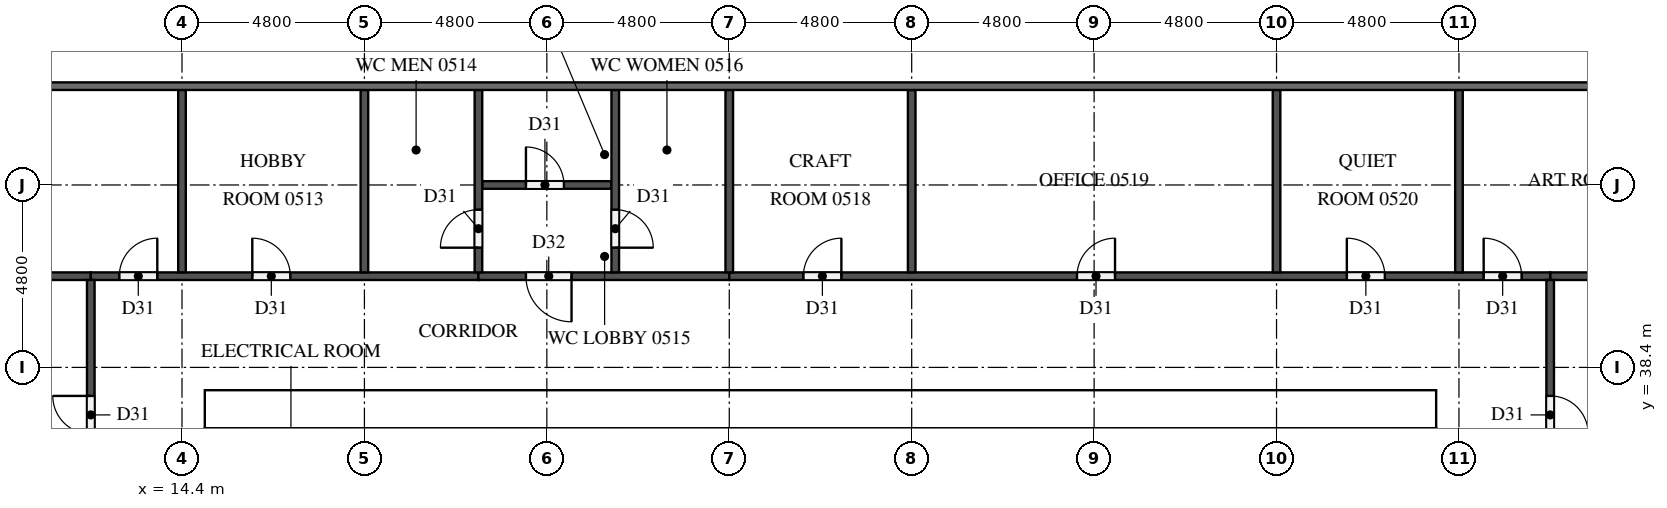
"""IFC4 building model, lengths in metres.
Left out: names, types, materials, properties, quantities, classifications, styles, units other than length and angle.
Written with IfcOpenShell. Run it as: python <this file> out.ifc"""

import sys

from ifc_helpers import new_model, si_unit, direction, frame, frame_2d, origin, place, context, subcontext, project, spatial, rectangle, extrude, element, fill, save


model = new_model("IFC4")
c1 = context("Model", 3, precision=1e-05, world=origin(), true_north=direction((0.0, 1.0)))
c2 = subcontext(c1, "Body", "Model", "MODEL_VIEW")
j1 = project(units=[si_unit("LENGTHUNIT", "METRE"), si_unit("PLANEANGLEUNIT", "RADIAN")], contexts=[c1])
p1 = place(None, origin())
s1 = spatial("IfcSite", under=j1, at=p1, CompositionType="ELEMENT")
p2 = place(p1, origin())
s2 = spatial("IfcBuilding", under=s1, at=p2, CompositionType="ELEMENT")
p3 = place(p2, frame((0.0, 0.0, 24.0)))
s3 = spatial("IfcBuildingStorey", under=s2, at=p3, CompositionType="ELEMENT", Elevation=24.0)
p4 = place(p3, frame((15.0, 37.3, 0.0), z_axis=(0.0, 0.0, 1.0), x_axis=(1.0, 0.0, 0.0)))
e1 = element("IfcWall", 1, at=p4, inside=s3, PredefinedType="SHEAR", context=c2, shape_type="SweptSolid", body=[
    extrude(rectangle(XDim=32.4, YDim=1.0, at=frame_2d((16.2, 0.0))), origin(), (0.0, 0.0, 1.0), 5.1),
])
p5 = place(p4, frame((15.3, 0.0, 0.0)))
e2 = element("IfcOpeningElement", 2, at=p5, cuts=e1, PredefinedType="OPENING", context=c2, shape_type="SweptSolid", body=[
    extrude(rectangle(XDim=1.8, YDim=2.1, at=frame_2d((0.9, 1.05))), frame((0.0, 0.51, 0.0), z_axis=(0.0, -1.0, 0.0), x_axis=(1.0, 0.0, 0.0)), (0.0, 0.0, 1.0), 1.02),
])
p6 = place(p4, frame((1.766, 0.0, 0.0)))
e3 = element("IfcOpeningElement", 3, at=p6, cuts=e1, PredefinedType="OPENING", context=c2, shape_type="SweptSolid", body=[
    extrude(rectangle(XDim=1.0, YDim=2.1, at=frame_2d((0.5, 1.05))), frame((0.0, 0.51, 0.0), z_axis=(0.0, -1.0, 0.0), x_axis=(1.0, 0.0, 0.0)), (0.0, 0.0, 1.0), 1.02),
])
p7 = place(p4, frame((5.241, 0.0, 0.0)))
e4 = element("IfcOpeningElement", 4, at=p7, cuts=e1, PredefinedType="OPENING", context=c2, shape_type="SweptSolid", body=[
    extrude(rectangle(XDim=1.0, YDim=2.1, at=frame_2d((0.5, 1.05))), frame((0.0, 0.51, 0.0), z_axis=(0.0, -1.0, 0.0), x_axis=(1.0, 0.0, 0.0)), (0.0, 0.0, 1.0), 1.02),
])
for number, where, z_axis, x_axis in (
    (5, (28.7, 33.9, 0.0), (0.0, 0.0, 1.0), (0.0, 1.0, 0.0)),
    (6, (33.7, 33.9, 0.0), (0.0, 0.0, 1.0), (0.0, 1.0, 0.0)),
):
    element("IfcWall", number, at=place(p3, frame(where, z_axis=z_axis, x_axis=x_axis)), inside=s3, PredefinedType="SHEAR", context=c2, shape_type="SweptSolid", body=[
        extrude(rectangle(XDim=2.9, YDim=0.7, at=frame_2d((1.45, 0.0))), origin(), (0.0, 0.0, 1.0), 5.1),
    ])
for number, where, z_axis, x_axis in (
    (7, (25.9, 33.9, 0.0), (0.0, 0.0, 1.0), (0.0, 1.0, 0.0)),
    (8, (36.5, 33.9, 0.0), (0.0, 0.0, 1.0), (0.0, 1.0, 0.0)),
):
    element("IfcWall", number, at=place(p3, frame(where, z_axis=z_axis, x_axis=x_axis)), inside=s3, PredefinedType="SOLIDWALL", context=c2, shape_type="SweptSolid", body=[
        extrude(rectangle(XDim=2.9, YDim=0.2, at=frame_2d((1.45, 0.0))), origin(), (0.0, 0.0, 1.0), 5.1),
    ])
p8 = place(p3, frame((18.633, 31.6, 0.0), z_axis=(0.0, 0.0, 1.0), x_axis=(0.0, 1.0, 0.0)))
e9 = element("IfcWall", 9, at=p8, inside=s3, PredefinedType="PARTITIONING", context=c2, shape_type="SweptSolid", body=[
    extrude(rectangle(XDim=5.2, YDim=0.2, at=frame_2d((2.6, 0.0))), origin(), (0.0, 0.0, 1.0), 5.1),
])
p9 = place(p3, frame((2.3, 40.8, 0.0), z_axis=(0.0, 0.0, 1.0), x_axis=(1.0, 0.0, 0.0)))
e10 = element("IfcWall", 10, at=p9, inside=s3, PredefinedType="PARTITIONING", context=c2, shape_type="SweptSolid", body=[
    extrude(rectangle(XDim=9.7, YDim=0.2, at=frame_2d((4.85, 0.0))), origin(), (0.0, 0.0, 1.0), 5.1),
])
p10 = place(p3, frame((50.4, 40.8, 0.0), z_axis=(0.0, 0.0, 1.0), x_axis=(1.0, 0.0, 0.0)))
e11 = element("IfcWall", 11, at=p10, inside=s3, PredefinedType="PARTITIONING", context=c2, shape_type="SweptSolid", body=[
    extrude(rectangle(XDim=4.9, YDim=0.2, at=frame_2d((2.45, 0.0))), origin(), (0.0, 0.0, 1.0), 5.1),
])
p11 = place(p3, frame((12.0, 40.8, 0.0), z_axis=(0.0, 0.0, 1.0), x_axis=(1.0, 0.0, 0.0)))
e12 = element("IfcWall", 12, at=p11, inside=s3, PredefinedType="PARTITIONING", context=c2, shape_type="SweptSolid", body=[
    extrude(rectangle(XDim=10.2, YDim=0.2, at=frame_2d((5.1, 0.0))), origin(), (0.0, 0.0, 1.0), 5.1),
])
p12 = place(p11, frame((0.75, 0.0, 0.0)))
e13 = element("IfcOpeningElement", 13, at=p12, cuts=e12, PredefinedType="OPENING", context=c2, shape_type="SweptSolid", body=[
    extrude(rectangle(XDim=1.0, YDim=2.1, at=frame_2d((0.5, 1.05))), frame((0.0, 0.11, 0.0), z_axis=(0.0, -1.0, 0.0), x_axis=(1.0, 0.0, 0.0)), (0.0, 0.0, 1.0), 0.22),
])
p13 = place(p11, frame((4.25, 0.0, 0.0)))
e14 = element("IfcOpeningElement", 14, at=p13, cuts=e12, PredefinedType="OPENING", context=c2, shape_type="SweptSolid", body=[
    extrude(rectangle(XDim=1.0, YDim=2.1, at=frame_2d((0.5, 1.05))), frame((0.0, 0.11, 0.0), z_axis=(0.0, -1.0, 0.0), x_axis=(1.0, 0.0, 0.0)), (0.0, 0.0, 1.0), 0.22),
])
p14 = place(p3, frame((28.8, 40.8, 0.0), z_axis=(0.0, 0.0, 1.0), x_axis=(-1.0, 0.0, 0.0)))
e15 = element("IfcWall", 15, at=p14, inside=s3, PredefinedType="PARTITIONING", context=c2, shape_type="SweptSolid", body=[
    extrude(rectangle(XDim=6.6, YDim=0.2, at=frame_2d((3.3, 0.0))), origin(), (0.0, 0.0, 1.0), 5.1),
])
p15 = place(p14, frame((4.15, 0.0, 0.0)))
e16 = element("IfcOpeningElement", 16, at=p15, cuts=e15, PredefinedType="OPENING", context=c2, shape_type="SweptSolid", body=[
    extrude(rectangle(XDim=1.2, YDim=2.1, at=frame_2d((0.6, 1.05))), frame((0.0, 0.11, 0.0), z_axis=(0.0, -1.0, 0.0), x_axis=(1.0, 0.0, 0.0)), (0.0, 0.0, 1.0), 0.22),
])
p16 = place(p3, frame((28.8, 40.8, 0.0), z_axis=(0.0, 0.0, 1.0), x_axis=(1.0, 0.0, 0.0)))
e17 = element("IfcWall", 17, at=p16, inside=s3, PredefinedType="PARTITIONING", context=c2, shape_type="SweptSolid", body=[
    extrude(rectangle(XDim=21.6, YDim=0.2, at=frame_2d((10.8, 0.0))), origin(), (0.0, 0.0, 1.0), 5.1),
])
p17 = place(p16, frame((1.95, 0.0, 0.0)))
e18 = element("IfcOpeningElement", 18, at=p17, cuts=e17, PredefinedType="OPENING", context=c2, shape_type="SweptSolid", body=[
    extrude(rectangle(XDim=1.0, YDim=2.1, at=frame_2d((0.5, 1.05))), frame((0.0, 0.11, 0.0), z_axis=(0.0, -1.0, 0.0), x_axis=(1.0, 0.0, 0.0)), (0.0, 0.0, 1.0), 0.22),
])
p18 = place(p16, frame((9.15, 0.0, 0.0)))
e19 = element("IfcOpeningElement", 19, at=p18, cuts=e17, PredefinedType="OPENING", context=c2, shape_type="SweptSolid", body=[
    extrude(rectangle(XDim=1.0, YDim=2.1, at=frame_2d((0.5, 1.05))), frame((0.0, 0.11, 0.0), z_axis=(0.0, -1.0, 0.0), x_axis=(1.0, 0.0, 0.0)), (0.0, 0.0, 1.0), 0.22),
])
p19 = place(p16, frame((16.25, 0.0, 0.0)))
e20 = element("IfcOpeningElement", 20, at=p19, cuts=e17, PredefinedType="OPENING", context=c2, shape_type="SweptSolid", body=[
    extrude(rectangle(XDim=1.0, YDim=2.1, at=frame_2d((0.5, 1.05))), frame((0.0, 0.11, 0.0), z_axis=(0.0, -1.0, 0.0), x_axis=(1.0, 0.0, 0.0)), (0.0, 0.0, 1.0), 0.22),
])
p20 = place(p16, frame((19.85, 0.0, 0.0)))
e21 = element("IfcOpeningElement", 21, at=p20, cuts=e17, PredefinedType="OPENING", context=c2, shape_type="SweptSolid", body=[
    extrude(rectangle(XDim=1.0, YDim=2.1, at=frame_2d((0.5, 1.05))), frame((0.0, 0.11, 0.0), z_axis=(0.0, -1.0, 0.0), x_axis=(1.0, 0.0, 0.0)), (0.0, 0.0, 1.0), 0.22),
])
p21 = place(p3, frame((22.3, 43.2, 0.0), z_axis=(0.0, 0.0, 1.0), x_axis=(1.0, 0.0, 0.0)))
e22 = element("IfcWall", 22, at=p21, inside=s3, PredefinedType="PARTITIONING", context=c2, shape_type="SweptSolid", body=[
    extrude(rectangle(XDim=3.4, YDim=0.2, at=frame_2d((1.7, 0.0))), origin(), (0.0, 0.0, 1.0), 5.1),
])
p22 = place(p21, frame((1.15, 0.0, 0.0)))
e23 = element("IfcOpeningElement", 23, at=p22, cuts=e22, PredefinedType="OPENING", context=c2, shape_type="SweptSolid", body=[
    extrude(rectangle(XDim=1.0, YDim=2.1, at=frame_2d((0.5, 1.05))), frame((0.0, 0.11, 0.0), z_axis=(0.0, -1.0, 0.0), x_axis=(1.0, 0.0, 0.0)), (0.0, 0.0, 1.0), 0.22),
])
p23 = place(p3, frame((12.0, 12.1, 0.0), z_axis=(0.0, 0.0, 1.0), x_axis=(0.0, 1.0, 0.0)))
e24 = element("IfcWall", 24, at=p23, inside=s3, PredefinedType="PARTITIONING", context=c2, shape_type="SweptSolid", body=[
    extrude(rectangle(XDim=28.6, YDim=0.2, at=frame_2d((14.3, 0.0))), origin(), (0.0, 0.0, 1.0), 5.1),
])
p24 = place(p23, frame((3.05, 0.0, 0.0)))
e25 = element("IfcOpeningElement", 25, at=p24, cuts=e24, PredefinedType="OPENING", context=c2, shape_type="SweptSolid", body=[
    extrude(rectangle(XDim=1.0, YDim=2.1, at=frame_2d((0.5, 1.05))), frame((0.0, 0.11, 0.0), z_axis=(0.0, -1.0, 0.0), x_axis=(1.0, 0.0, 0.0)), (0.0, 0.0, 1.0), 0.22),
])
p25 = place(p23, frame((9.05, 0.0, 0.0)))
e26 = element("IfcOpeningElement", 26, at=p25, cuts=e24, PredefinedType="OPENING", context=c2, shape_type="SweptSolid", body=[
    extrude(rectangle(XDim=1.0, YDim=2.1, at=frame_2d((0.5, 1.05))), frame((0.0, 0.11, 0.0), z_axis=(0.0, -1.0, 0.0), x_axis=(1.0, 0.0, 0.0)), (0.0, 0.0, 1.0), 0.22),
])
p26 = place(p23, frame((13.85, 0.0, 0.0)))
e27 = element("IfcOpeningElement", 27, at=p26, cuts=e24, PredefinedType="OPENING", context=c2, shape_type="SweptSolid", body=[
    extrude(rectangle(XDim=1.0, YDim=2.1, at=frame_2d((0.5, 1.05))), frame((0.0, 0.11, 0.0), z_axis=(0.0, -1.0, 0.0), x_axis=(1.0, 0.0, 0.0)), (0.0, 0.0, 1.0), 0.22),
])
p27 = place(p23, frame((18.65, 0.0, 0.0)))
e28 = element("IfcOpeningElement", 28, at=p27, cuts=e24, PredefinedType="OPENING", context=c2, shape_type="SweptSolid", body=[
    extrude(rectangle(XDim=1.0, YDim=2.1, at=frame_2d((0.5, 1.05))), frame((0.0, 0.11, 0.0), z_axis=(0.0, -1.0, 0.0), x_axis=(1.0, 0.0, 0.0)), (0.0, 0.0, 1.0), 0.22),
])
p28 = place(p23, frame((24.55, 0.0, 0.0)))
e29 = element("IfcOpeningElement", 29, at=p28, cuts=e24, PredefinedType="OPENING", context=c2, shape_type="SweptSolid", body=[
    extrude(rectangle(XDim=1.0, YDim=2.1, at=frame_2d((0.5, 1.05))), frame((0.0, 0.11, 0.0), z_axis=(0.0, -1.0, 0.0), x_axis=(1.0, 0.0, 0.0)), (0.0, 0.0, 1.0), 0.22),
])
for number, where, z_axis, x_axis in (
    (30, (14.4, 40.9, 0.0), (0.0, 0.0, 1.0), (0.0, 1.0, 0.0)),
    (31, (19.2, 40.9, 0.0), (0.0, 0.0, 1.0), (0.0, 1.0, 0.0)),
):
    element("IfcWall", number, at=place(p3, frame(where, z_axis=z_axis, x_axis=x_axis)), inside=s3, PredefinedType="PARTITIONING", context=c2, shape_type="SweptSolid", body=[
        extrude(rectangle(XDim=4.8, YDim=0.2, at=frame_2d((2.4, 0.0))), origin(), (0.0, 0.0, 1.0), 5.1),
    ])
p29 = place(p3, frame((22.2, 40.9, 0.0), z_axis=(0.0, 0.0, 1.0), x_axis=(0.0, 1.0, 0.0)))
e32 = element("IfcWall", 32, at=p29, inside=s3, PredefinedType="PARTITIONING", context=c2, shape_type="SweptSolid", body=[
    extrude(rectangle(XDim=4.8, YDim=0.2, at=frame_2d((2.4, 0.0))), origin(), (0.0, 0.0, 1.0), 5.1),
])
p30 = place(p29, frame((0.65, 0.0, 0.0)))
e33 = element("IfcOpeningElement", 33, at=p30, cuts=e32, PredefinedType="OPENING", context=c2, shape_type="SweptSolid", body=[
    extrude(rectangle(XDim=1.0, YDim=2.1, at=frame_2d((0.5, 1.05))), frame((0.0, 0.11, 0.0), z_axis=(0.0, -1.0, 0.0), x_axis=(1.0, 0.0, 0.0)), (0.0, 0.0, 1.0), 0.22),
])
p31 = place(p3, frame((25.8, 45.7, 0.0), z_axis=(0.0, 0.0, 1.0), x_axis=(0.0, -1.0, 0.0)))
e34 = element("IfcWall", 34, at=p31, inside=s3, PredefinedType="PARTITIONING", context=c2, shape_type="SweptSolid", body=[
    extrude(rectangle(XDim=4.8, YDim=0.2, at=frame_2d((2.4, 0.0))), origin(), (0.0, 0.0, 1.0), 5.1),
])
p32 = place(p31, frame((3.15, 0.0, 0.0)))
e35 = element("IfcOpeningElement", 35, at=p32, cuts=e34, PredefinedType="OPENING", context=c2, shape_type="SweptSolid", body=[
    extrude(rectangle(XDim=1.0, YDim=2.1, at=frame_2d((0.5, 1.05))), frame((0.0, 0.11, 0.0), z_axis=(0.0, -1.0, 0.0), x_axis=(1.0, 0.0, 0.0)), (0.0, 0.0, 1.0), 0.22),
])
for number, where, z_axis, x_axis in (
    (36, (28.8, 40.9, 0.0), (0.0, 0.0, 1.0), (0.0, 1.0, 0.0)),
    (37, (33.6, 40.9, 0.0), (0.0, 0.0, 1.0), (0.0, 1.0, 0.0)),
    (38, (43.2, 40.9, 0.0), (0.0, 0.0, 1.0), (0.0, 1.0, 0.0)),
    (39, (48.0, 40.9, 0.0), (0.0, 0.0, 1.0), (0.0, 1.0, 0.0)),
):
    element("IfcWall", number, at=place(p3, frame(where, z_axis=z_axis, x_axis=x_axis)), inside=s3, PredefinedType="PARTITIONING", context=c2, shape_type="SweptSolid", body=[
        extrude(rectangle(XDim=4.8, YDim=0.2, at=frame_2d((2.4, 0.0))), origin(), (0.0, 0.0, 1.0), 5.1),
    ])
p33 = place(p3, frame((50.4, 40.7, 0.0), z_axis=(0.0, 0.0, 1.0), x_axis=(0.0, -1.0, 0.0)))
e40 = element("IfcWall", 40, at=p33, inside=s3, PredefinedType="PARTITIONING", context=c2, shape_type="SweptSolid", body=[
    extrude(rectangle(XDim=28.6, YDim=0.2, at=frame_2d((14.3, 0.0))), origin(), (0.0, 0.0, 1.0), 5.1),
])
p34 = place(p33, frame((24.55, 0.0, 0.0)))
e41 = element("IfcOpeningElement", 41, at=p34, cuts=e40, PredefinedType="OPENING", context=c2, shape_type="SweptSolid", body=[
    extrude(rectangle(XDim=1.0, YDim=2.1, at=frame_2d((0.5, 1.05))), frame((0.0, 0.11, 0.0), z_axis=(0.0, -1.0, 0.0), x_axis=(1.0, 0.0, 0.0)), (0.0, 0.0, 1.0), 0.22),
])
p35 = place(p33, frame((18.65, 0.0, 0.0)))
e42 = element("IfcOpeningElement", 42, at=p35, cuts=e40, PredefinedType="OPENING", context=c2, shape_type="SweptSolid", body=[
    extrude(rectangle(XDim=1.0, YDim=2.1, at=frame_2d((0.5, 1.05))), frame((0.0, 0.11, 0.0), z_axis=(0.0, -1.0, 0.0), x_axis=(1.0, 0.0, 0.0)), (0.0, 0.0, 1.0), 0.22),
])
p36 = place(p33, frame((13.85, 0.0, 0.0)))
e43 = element("IfcOpeningElement", 43, at=p36, cuts=e40, PredefinedType="OPENING", context=c2, shape_type="SweptSolid", body=[
    extrude(rectangle(XDim=1.0, YDim=2.1, at=frame_2d((0.5, 1.05))), frame((0.0, 0.11, 0.0), z_axis=(0.0, -1.0, 0.0), x_axis=(1.0, 0.0, 0.0)), (0.0, 0.0, 1.0), 0.22),
])
p37 = place(p33, frame((9.05, 0.0, 0.0)))
e44 = element("IfcOpeningElement", 44, at=p37, cuts=e40, PredefinedType="OPENING", context=c2, shape_type="SweptSolid", body=[
    extrude(rectangle(XDim=1.0, YDim=2.1, at=frame_2d((0.5, 1.05))), frame((0.0, 0.11, 0.0), z_axis=(0.0, -1.0, 0.0), x_axis=(1.0, 0.0, 0.0)), (0.0, 0.0, 1.0), 0.22),
])
p38 = place(p33, frame((3.05, 0.0, 0.0)))
e45 = element("IfcOpeningElement", 45, at=p38, cuts=e40, PredefinedType="OPENING", context=c2, shape_type="SweptSolid", body=[
    extrude(rectangle(XDim=1.0, YDim=2.1, at=frame_2d((0.5, 1.05))), frame((0.0, 0.11, 0.0), z_axis=(0.0, -1.0, 0.0), x_axis=(1.0, 0.0, 0.0)), (0.0, 0.0, 1.0), 0.22),
])
p39 = place(p5, origin())
e46 = element("IfcDoor", 46, at=p39, inside=s3, OperationType="DOUBLE_DOOR_SINGLE_SWING", PredefinedType="DOOR", context=c2, shape_type="SweptSolid", body=[
    extrude(rectangle(XDim=1.8, YDim=2.1, at=frame_2d((0.9, 1.05))), frame((0.0, 0.025, 0.0), z_axis=(0.0, -1.0, 0.0), x_axis=(1.0, 0.0, 0.0)), (0.0, 0.0, 1.0), 0.05),
])
fill(e2, e46)
p40 = place(p6, origin())
e47 = element("IfcDoor", 47, at=p40, inside=s3, OperationType="SINGLE_SWING_RIGHT", PredefinedType="DOOR", context=c2, shape_type="SweptSolid", body=[
    extrude(rectangle(XDim=1.0, YDim=2.1, at=frame_2d((0.5, 1.05))), frame((0.0, 0.025, 0.0), z_axis=(0.0, -1.0, 0.0), x_axis=(1.0, 0.0, 0.0)), (0.0, 0.0, 1.0), 0.05),
])
fill(e3, e47)
p41 = place(p7, origin())
e48 = element("IfcDoor", 48, at=p41, inside=s3, OperationType="SINGLE_SWING_LEFT", PredefinedType="DOOR", context=c2, shape_type="SweptSolid", body=[
    extrude(rectangle(XDim=1.0, YDim=2.1, at=frame_2d((0.5, 1.05))), frame((0.0, 0.025, 0.0), z_axis=(0.0, -1.0, 0.0), x_axis=(1.0, 0.0, 0.0)), (0.0, 0.0, 1.0), 0.05),
])
fill(e4, e48)
p42 = place(p28, origin())
e49 = element("IfcDoor", 49, at=p42, inside=s3, OperationType="SINGLE_SWING_RIGHT", PredefinedType="DOOR", context=c2, shape_type="SweptSolid", body=[
    extrude(rectangle(XDim=1.0, YDim=2.1, at=frame_2d((0.5, 1.05))), frame((0.0, 0.025, 0.0), z_axis=(0.0, -1.0, 0.0), x_axis=(1.0, 0.0, 0.0)), (0.0, 0.0, 1.0), 0.05),
])
fill(e29, e49)
p43 = place(p12, origin())
e50 = element("IfcDoor", 50, at=p43, inside=s3, OperationType="SINGLE_SWING_RIGHT", PredefinedType="DOOR", context=c2, shape_type="SweptSolid", body=[
    extrude(rectangle(XDim=1.0, YDim=2.1, at=frame_2d((0.5, 1.05))), frame((0.0, 0.025, 0.0), z_axis=(0.0, -1.0, 0.0), x_axis=(1.0, 0.0, 0.0)), (0.0, 0.0, 1.0), 0.05),
])
fill(e13, e50)
p44 = place(p13, origin())
e51 = element("IfcDoor", 51, at=p44, inside=s3, OperationType="SINGLE_SWING_LEFT", PredefinedType="DOOR", context=c2, shape_type="SweptSolid", body=[
    extrude(rectangle(XDim=1.0, YDim=2.1, at=frame_2d((0.5, 1.05))), frame((0.0, 0.025, 0.0), z_axis=(0.0, -1.0, 0.0), x_axis=(1.0, 0.0, 0.0)), (0.0, 0.0, 1.0), 0.05),
])
fill(e14, e51)
p45 = place(p15, origin())
e52 = element("IfcDoor", 52, at=p45, inside=s3, OperationType="SINGLE_SWING_LEFT", PredefinedType="DOOR", context=c2, shape_type="SweptSolid", body=[
    extrude(rectangle(XDim=1.2, YDim=2.1, at=frame_2d((0.6, 1.05))), frame((0.0, 0.025, 0.0), z_axis=(0.0, -1.0, 0.0), x_axis=(1.0, 0.0, 0.0)), (0.0, 0.0, 1.0), 0.05),
])
fill(e16, e52)
p46 = place(p30, origin())
e53 = element("IfcDoor", 53, at=p46, inside=s3, OperationType="SINGLE_SWING_LEFT", PredefinedType="DOOR", context=c2, shape_type="SweptSolid", body=[
    extrude(rectangle(XDim=1.0, YDim=2.1, at=frame_2d((0.5, 1.05))), frame((0.0, 0.025, 0.0), z_axis=(0.0, -1.0, 0.0), x_axis=(1.0, 0.0, 0.0)), (0.0, 0.0, 1.0), 0.05),
])
fill(e33, e53)
p47 = place(p32, origin())
e54 = element("IfcDoor", 54, at=p47, inside=s3, OperationType="SINGLE_SWING_RIGHT", PredefinedType="DOOR", context=c2, shape_type="SweptSolid", body=[
    extrude(rectangle(XDim=1.0, YDim=2.1, at=frame_2d((0.5, 1.05))), frame((0.0, 0.025, 0.0), z_axis=(0.0, -1.0, 0.0), x_axis=(1.0, 0.0, 0.0)), (0.0, 0.0, 1.0), 0.05),
])
fill(e35, e54)
p48 = place(p22, origin())
e55 = element("IfcDoor", 55, at=p48, inside=s3, OperationType="SINGLE_SWING_LEFT", PredefinedType="DOOR", context=c2, shape_type="SweptSolid", body=[
    extrude(rectangle(XDim=1.0, YDim=2.1, at=frame_2d((0.5, 1.05))), frame((0.0, 0.025, 0.0), z_axis=(0.0, -1.0, 0.0), x_axis=(1.0, 0.0, 0.0)), (0.0, 0.0, 1.0), 0.05),
])
fill(e23, e55)
p49 = place(p17, origin())
e56 = element("IfcDoor", 56, at=p49, inside=s3, OperationType="SINGLE_SWING_RIGHT", PredefinedType="DOOR", context=c2, shape_type="SweptSolid", body=[
    extrude(rectangle(XDim=1.0, YDim=2.1, at=frame_2d((0.5, 1.05))), frame((0.0, 0.025, 0.0), z_axis=(0.0, -1.0, 0.0), x_axis=(1.0, 0.0, 0.0)), (0.0, 0.0, 1.0), 0.05),
])
fill(e18, e56)
p50 = place(p18, origin())
e57 = element("IfcDoor", 57, at=p50, inside=s3, OperationType="SINGLE_SWING_RIGHT", PredefinedType="DOOR", context=c2, shape_type="SweptSolid", body=[
    extrude(rectangle(XDim=1.0, YDim=2.1, at=frame_2d((0.5, 1.05))), frame((0.0, 0.025, 0.0), z_axis=(0.0, -1.0, 0.0), x_axis=(1.0, 0.0, 0.0)), (0.0, 0.0, 1.0), 0.05),
])
fill(e19, e57)
p51 = place(p19, origin())
e58 = element("IfcDoor", 58, at=p51, inside=s3, OperationType="SINGLE_SWING_LEFT", PredefinedType="DOOR", context=c2, shape_type="SweptSolid", body=[
    extrude(rectangle(XDim=1.0, YDim=2.1, at=frame_2d((0.5, 1.05))), frame((0.0, 0.025, 0.0), z_axis=(0.0, -1.0, 0.0), x_axis=(1.0, 0.0, 0.0)), (0.0, 0.0, 1.0), 0.05),
])
fill(e20, e58)
p52 = place(p20, origin())
e59 = element("IfcDoor", 59, at=p52, inside=s3, OperationType="SINGLE_SWING_LEFT", PredefinedType="DOOR", context=c2, shape_type="SweptSolid", body=[
    extrude(rectangle(XDim=1.0, YDim=2.1, at=frame_2d((0.5, 1.05))), frame((0.0, 0.025, 0.0), z_axis=(0.0, -1.0, 0.0), x_axis=(1.0, 0.0, 0.0)), (0.0, 0.0, 1.0), 0.05),
])
fill(e21, e59)
p53 = place(p38, origin())
e60 = element("IfcDoor", 60, at=p53, inside=s3, OperationType="SINGLE_SWING_RIGHT", PredefinedType="DOOR", context=c2, shape_type="SweptSolid", body=[
    extrude(rectangle(XDim=1.0, YDim=2.1, at=frame_2d((0.5, 1.05))), frame((0.0, 0.025, 0.0), z_axis=(0.0, -1.0, 0.0), x_axis=(1.0, 0.0, 0.0)), (0.0, 0.0, 1.0), 0.05),
])
fill(e45, e60)
save(model, sys.argv[1])
